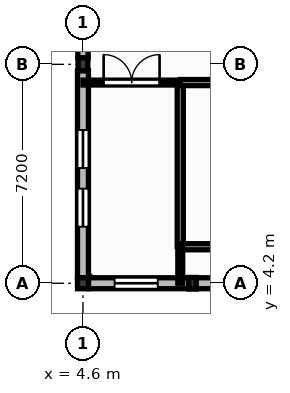
"""IFC4 building model, lengths in metres.
Left out: names, types, materials, properties, quantities, classifications, styles, units other than length and angle.
Written with IfcOpenShell. Run it as: python <this file> out.ifc"""

import sys

from ifc_helpers import new_model, si_unit, direction, frame, frame_2d, origin, origin_2d, place, context, subcontext, project, spatial, rectangle, extrude, element, fill, save


model = new_model("IFC4")
c1 = context("Model", 3, precision=1e-05, world=origin(), true_north=direction((0.0, 1.0)))
c2 = subcontext(c1, "Body", "Model", "MODEL_VIEW")
j1 = project(units=[si_unit("LENGTHUNIT", "METRE"), si_unit("PLANEANGLEUNIT", "RADIAN")], contexts=[c1])
p1 = place(None, origin())
s1 = spatial("IfcSite", under=j1, at=p1, CompositionType="ELEMENT")
p2 = place(p1, origin())
s2 = spatial("IfcBuilding", under=s1, at=p2, CompositionType="ELEMENT")
p3 = place(p2, frame((0.0, 0.0, 4.5)))
s3 = spatial("IfcBuildingStorey", under=s2, at=p3, CompositionType="ELEMENT", Elevation=4.5)
p4 = place(p3, frame((4.6, 4.2, 0.0), z_axis=(0.0, 0.0, 1.0), x_axis=(1.0, 0.0, 0.0)))
e1 = element("IfcColumn", 1, at=p4, inside=s3, PredefinedType="COLUMN", context=c2, shape_type="SweptSolid", body=[
    extrude(rectangle(XDim=0.36, YDim=0.36, at=origin_2d()), origin(), (0.0, 0.0, 1.0), 4.26),
])
p5 = place(p3, frame((4.6, 11.4, 0.0), z_axis=(0.0, 0.0, 1.0), x_axis=(1.0, 0.0, 0.0)))
e2 = element("IfcColumn", 2, at=p5, inside=s3, PredefinedType="COLUMN", context=c2, shape_type="SweptSolid", body=[
    extrude(rectangle(XDim=0.32, YDim=0.42, at=origin_2d()), origin(), (0.0, 0.0, 1.0), 4.26),
])
p6 = place(p3, frame((8.2, 4.2, 0.0), z_axis=(0.0, 0.0, 1.0), x_axis=(1.0, 0.0, 0.0)))
e3 = element("IfcColumn", 3, at=p6, inside=s3, PredefinedType="PILASTER", context=c2, shape_type="SweptSolid", body=[
    extrude(rectangle(XDim=0.24, YDim=0.38, at=origin_2d()), origin(), (0.0, 0.0, 1.0), 4.26),
])
p7 = place(p3, frame((4.78, 4.2, 0.0), z_axis=(0.0, 0.0, 1.0), x_axis=(1.0, 0.0, 0.0)))
e4 = element("IfcWall", 4, at=p7, inside=s3, PredefinedType="SOLIDWALL", context=c2, shape_type="SweptSolid", body=[
    extrude(rectangle(XDim=3.3, YDim=0.36, at=frame_2d((1.65, 0.0))), origin(), (0.0, 0.0, 1.0), 3.8),
])
p8 = place(p7, frame((0.86, 0.0, 0.9)))
e5 = element("IfcOpeningElement", 5, at=p8, cuts=e4, PredefinedType="OPENING", context=c2, shape_type="SweptSolid", body=[
    extrude(rectangle(XDim=1.42, YDim=2.4, at=frame_2d((0.71, 1.2))), frame((0.0, 0.19, 0.0), z_axis=(0.0, -1.0, 0.0), x_axis=(1.0, 0.0, 0.0)), (0.0, 0.0, 1.0), 0.38),
])
p9 = place(p3, frame((8.32, 4.2, 0.0), z_axis=(0.0, 0.0, 1.0), x_axis=(1.0, 0.0, 0.0)))
e6 = element("IfcWall", 6, at=p9, inside=s3, PredefinedType="SOLIDWALL", context=c2, shape_type="SweptSolid", body=[
    extrude(rectangle(XDim=3.32, YDim=0.36, at=frame_2d((1.66, 0.0))), origin(), (0.0, 0.0, 1.0), 3.8),
])
p10 = place(p9, frame((0.935, 0.0, 1.35)))
e7 = element("IfcOpeningElement", 7, at=p10, cuts=e6, PredefinedType="OPENING", context=c2, shape_type="SweptSolid", body=[
    extrude(rectangle(XDim=1.45, YDim=1.4, at=frame_2d((0.725, 0.7))), frame((0.0, 0.19, 0.0), z_axis=(0.0, -1.0, 0.0), x_axis=(1.0, 0.0, 0.0)), (0.0, 0.0, 1.0), 0.38),
])
p11 = place(p3, frame((4.6, 4.38, 0.0), z_axis=(0.0, 0.0, 1.0), x_axis=(0.0, 1.0, 0.0)))
e8 = element("IfcWall", 8, at=p11, inside=s3, PredefinedType="SOLIDWALL", context=c2, shape_type="SweptSolid", body=[
    extrude(rectangle(XDim=6.81, YDim=0.36, at=frame_2d((3.405, 0.0))), origin(), (0.0, 0.0, 1.0), 3.8),
])
p12 = place(p11, frame((1.68, 0.0, 1.35)))
e9 = element("IfcOpeningElement", 9, at=p12, cuts=e8, PredefinedType="OPENING", context=c2, shape_type="SweptSolid", body=[
    extrude(rectangle(XDim=1.25, YDim=1.4, at=frame_2d((0.625, 0.7))), frame((0.0, 0.19, 0.0), z_axis=(0.0, -1.0, 0.0), x_axis=(1.0, 0.0, 0.0)), (0.0, 0.0, 1.0), 0.38),
])
p13 = place(p11, frame((3.61, 0.0, 1.35)))
e10 = element("IfcOpeningElement", 10, at=p13, cuts=e8, PredefinedType="OPENING", context=c2, shape_type="SweptSolid", body=[
    extrude(rectangle(XDim=1.25, YDim=1.4, at=frame_2d((0.625, 0.7))), frame((0.0, 0.19, 0.0), z_axis=(0.0, -1.0, 0.0), x_axis=(1.0, 0.0, 0.0)), (0.0, 0.0, 1.0), 0.38),
])
p14 = place(p3, frame((4.6, 11.61, 0.0), z_axis=(0.0, 0.0, 1.0), x_axis=(0.0, 1.0, 0.0)))
e11 = element("IfcWall", 11, at=p14, inside=s3, PredefinedType="SOLIDWALL", context=c2, shape_type="SweptSolid", body=[
    extrude(rectangle(XDim=6.81, YDim=0.34, at=frame_2d((3.405, 0.0))), origin(), (0.0, 0.0, 1.0), 3.8),
])
p15 = place(p14, frame((3.415, 0.0, 1.35)))
e12 = element("IfcOpeningElement", 12, at=p15, cuts=e11, PredefinedType="OPENING", context=c2, shape_type="SweptSolid", body=[
    extrude(rectangle(XDim=1.65, YDim=1.4, at=frame_2d((0.825, 0.7))), frame((0.0, 0.18, 0.0), z_axis=(0.0, -1.0, 0.0), x_axis=(1.0, 0.0, 0.0)), (0.0, 0.0, 1.0), 0.36),
])
p16 = place(p3, frame((4.6, 10.8, 0.0), z_axis=(0.0, 0.0, 1.0), x_axis=(1.0, 0.0, 0.0)))
e13 = element("IfcWall", 13, at=p16, inside=s3, PredefinedType="PARTITIONING", context=c2, shape_type="SweptSolid", body=[
    extrude(rectangle(XDim=3.2, YDim=0.16, at=frame_2d((1.6, 0.0))), origin(), (0.0, 0.0, 1.0), 4.18),
])
p17 = place(p16, frame((0.68, 0.0, 0.0)))
e14 = element("IfcOpeningElement", 14, at=p17, cuts=e13, PredefinedType="OPENING", context=c2, shape_type="SweptSolid", body=[
    extrude(rectangle(XDim=1.84, YDim=2.35, at=frame_2d((0.92, 1.175))), frame((0.0, 0.09, 0.0), z_axis=(0.0, -1.0, 0.0), x_axis=(1.0, 0.0, 0.0)), (0.0, 0.0, 1.0), 0.18),
])
p18 = place(p3, frame((7.8, 5.4, 0.0), z_axis=(0.0, 0.0, 1.0), x_axis=(0.0, 1.0, 0.0)))
e15 = element("IfcWall", 15, at=p18, inside=s3, PredefinedType="PARTITIONING", context=c2, shape_type="SweptSolid", body=[
    extrude(rectangle(XDim=5.33, YDim=0.2, at=frame_2d((2.665, 0.0))), origin(), (0.0, 0.0, 1.0), 4.18),
])
p19 = place(p3, frame((7.8, 10.8, 0.0), z_axis=(0.0, 0.0, 1.0), x_axis=(1.0, 0.0, 0.0)))
e16 = element("IfcWall", 16, at=p19, inside=s3, PredefinedType="PARTITIONING", context=c2, shape_type="SweptSolid", body=[
    extrude(rectangle(XDim=4.29, YDim=0.2, at=frame_2d((2.145, 0.0))), origin(), (0.0, 0.0, 1.0), 4.18),
])
p20 = place(p19, frame((1.405, 0.0, 0.0)))
e17 = element("IfcOpeningElement", 17, at=p20, cuts=e16, PredefinedType="OPENING", context=c2, shape_type="SweptSolid", body=[
    extrude(rectangle(XDim=1.48, YDim=2.25, at=frame_2d((0.74, 1.125))), frame((0.0, 0.11, 0.0), z_axis=(0.0, -1.0, 0.0), x_axis=(1.0, 0.0, 0.0)), (0.0, 0.0, 1.0), 0.22),
])
p21 = place(p3, frame((7.8, 5.4, 0.0), z_axis=(0.0, 0.0, 1.0), x_axis=(1.0, 0.0, 0.0)))
e18 = element("IfcWall", 18, at=p21, inside=s3, PredefinedType="PARTITIONING", context=c2, shape_type="SweptSolid", body=[
    extrude(rectangle(XDim=4.26, YDim=0.2, at=frame_2d((2.13, 0.0))), origin(), (0.0, 0.0, 1.0), 4.18),
])
p22 = place(p3, frame((7.8, 4.2, 0.0), z_axis=(0.0, 0.0, 1.0), x_axis=(0.0, 1.0, 0.0)))
e19 = element("IfcWall", 19, at=p22, inside=s3, PredefinedType="PARTITIONING", context=c2, shape_type="SweptSolid", body=[
    extrude(rectangle(XDim=1.2, YDim=0.16, at=frame_2d((0.6, 0.0))), origin(), (0.0, 0.0, 1.0), 4.18),
])
p23 = place(p8, origin())
e20 = element("IfcWindow", 20, at=p23, inside=s3, PartitioningType="SINGLE_PANEL", PredefinedType="WINDOW", context=c2, shape_type="SweptSolid", body=[
    extrude(rectangle(XDim=1.42, YDim=2.4, at=frame_2d((0.71, 1.2))), frame((0.0, 0.03, 0.0), z_axis=(0.0, -1.0, 0.0), x_axis=(1.0, 0.0, 0.0)), (0.0, 0.0, 1.0), 0.06),
])
fill(e5, e20)
p24 = place(p12, origin())
e21 = element("IfcWindow", 21, at=p24, inside=s3, PartitioningType="SINGLE_PANEL", PredefinedType="WINDOW", context=c2, shape_type="SweptSolid", body=[
    extrude(rectangle(XDim=1.25, YDim=1.4, at=frame_2d((0.625, 0.7))), frame((0.0, 0.03, 0.0), z_axis=(0.0, -1.0, 0.0), x_axis=(1.0, 0.0, 0.0)), (0.0, 0.0, 1.0), 0.06),
])
fill(e9, e21)
p25 = place(p13, origin())
e22 = element("IfcWindow", 22, at=p25, inside=s3, PartitioningType="SINGLE_PANEL", PredefinedType="WINDOW", context=c2, shape_type="SweptSolid", body=[
    extrude(rectangle(XDim=1.25, YDim=1.4, at=frame_2d((0.625, 0.7))), frame((0.0, 0.03, 0.0), z_axis=(0.0, -1.0, 0.0), x_axis=(1.0, 0.0, 0.0)), (0.0, 0.0, 1.0), 0.06),
])
fill(e10, e22)
p26 = place(p17, origin())
e23 = element("IfcDoor", 23, at=p26, inside=s3, OperationType="DOUBLE_DOOR_SINGLE_SWING", PredefinedType="DOOR", context=c2, shape_type="SweptSolid", body=[
    extrude(rectangle(XDim=1.84, YDim=2.35, at=frame_2d((0.92, 1.175))), frame((0.0, 0.025, 0.0), z_axis=(0.0, -1.0, 0.0), x_axis=(1.0, 0.0, 0.0)), (0.0, 0.0, 1.0), 0.05),
])
fill(e14, e23)
save(model, sys.argv[1])
